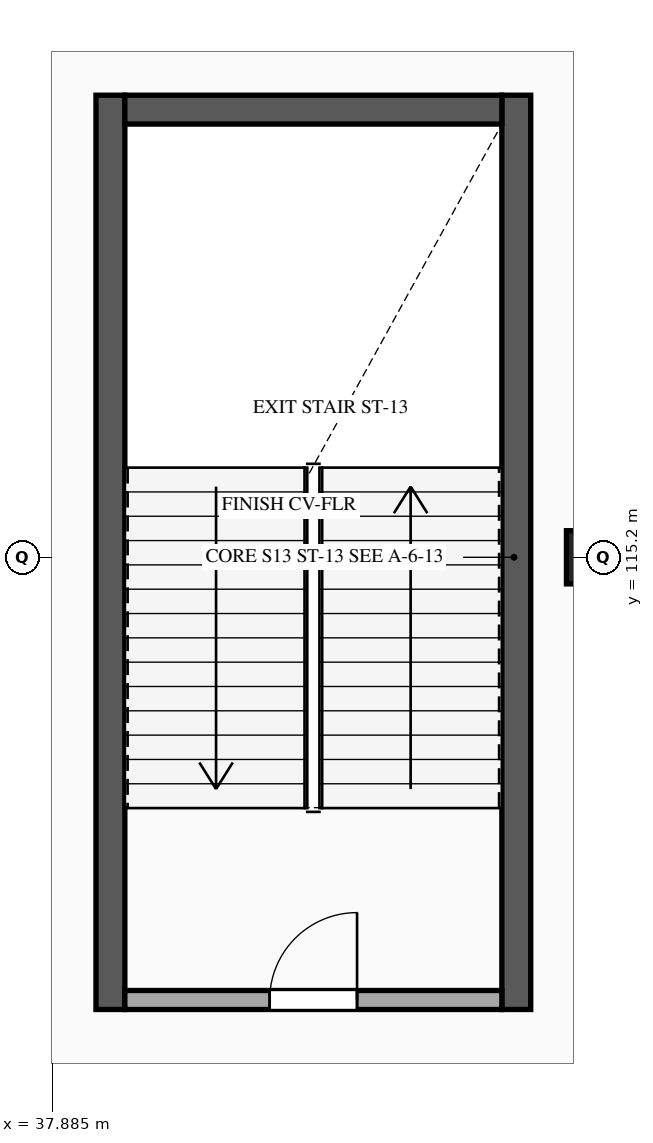
"""IFC4 building model, lengths in metres.
Left out: names, types, materials, properties, quantities, classifications, styles, units other than length and angle.
Written with IfcOpenShell. Run it as: python <this file> out.ifc"""

import sys

from ifc_helpers import new_model, si_unit, direction, frame, frame_2d, origin, origin_2d, place, context, subcontext, project, spatial, rectangle, extrude, element, fill, save


model = new_model("IFC4")
c1 = context("Model", 3, precision=1e-05, world=origin(), true_north=direction((0.0, 1.0)))
c2 = subcontext(c1, "Body", "Model", "MODEL_VIEW")
j1 = project(units=[si_unit("LENGTHUNIT", "METRE"), si_unit("PLANEANGLEUNIT", "RADIAN")], contexts=[c1])
p1 = place(None, origin())
s1 = spatial("IfcSite", under=j1, at=p1, CompositionType="ELEMENT")
p2 = place(p1, origin())
s2 = spatial("IfcBuilding", under=s1, at=p2, CompositionType="ELEMENT")
p3 = place(p2, frame((0.0, 0.0, 10.8)))
s3 = spatial("IfcBuildingStorey", under=s2, at=p3, CompositionType="ELEMENT", Elevation=10.8)
p4 = place(p3, frame((45.0, 115.2, 0.0), z_axis=(0.0, 0.0, 1.0), x_axis=(1.0, 0.0, 0.0)))
e1 = element("IfcColumn", 1, at=p4, inside=s3, PredefinedType="COLUMN", context=c2, shape_type="SweptSolid", body=[
    extrude(rectangle(XDim=0.7, YDim=0.7, at=origin_2d()), origin(), (0.0, 0.0, 1.0), 4.5),
])
for number, where, z_axis, x_axis in (
    (2, (38.65, 109.25, 0.0), (0.0, 0.0, 1.0), (0.0, 1.0, 0.0)),
    (3, (43.99, 121.28, 0.0), (0.0, 0.0, 1.0), (0.0, -1.0, 0.0)),
):
    element("IfcWall", number, at=place(p3, frame(where, z_axis=z_axis, x_axis=x_axis)), inside=s3, PredefinedType="SHEAR", context=c2, shape_type="SweptSolid", body=[
        extrude(rectangle(XDim=12.03, YDim=0.38, at=frame_2d((6.015, 0.0))), origin(), (0.0, 0.0, 1.0), 4.25),
    ])
p5 = place(p3, frame((38.84, 121.09, 0.0), z_axis=(0.0, 0.0, 1.0), x_axis=(1.0, 0.0, 0.0)))
e4 = element("IfcWall", 4, at=p5, inside=s3, PredefinedType="SHEAR", context=c2, shape_type="SweptSolid", body=[
    extrude(rectangle(XDim=4.96, YDim=0.38, at=frame_2d((2.48, 0.0))), origin(), (0.0, 0.0, 1.0), 4.25),
])
p6 = place(p3, frame((38.84, 109.375, 0.0), z_axis=(0.0, 0.0, 1.0), x_axis=(1.0, 0.0, 0.0)))
e5 = element("IfcWall", 5, at=p6, inside=s3, PredefinedType="STANDARD", context=c2, shape_type="SweptSolid", body=[
    extrude(rectangle(XDim=4.96, YDim=0.25, at=frame_2d((2.48, 0.0))), origin(), (0.0, 0.0, 1.0), 4.22),
])
p7 = place(p6, frame((1.905, 0.0, 0.0)))
e6 = element("IfcOpeningElement", 6, at=p7, cuts=e5, PredefinedType="OPENING", context=c2, shape_type="SweptSolid", body=[
    extrude(rectangle(XDim=1.15, YDim=2.2, at=frame_2d((0.575, 1.1))), frame((0.0, 0.135, 0.0), z_axis=(0.0, -1.0, 0.0), x_axis=(1.0, 0.0, 0.0)), (0.0, 0.0, 1.0), 0.27),
])
p8 = place(p7, origin())
e7 = element("IfcDoor", 7, at=p8, inside=s3, OperationType="SINGLE_SWING_RIGHT", PredefinedType="DOOR", context=c2, shape_type="SweptSolid", body=[
    extrude(rectangle(XDim=1.15, YDim=2.2, at=frame_2d((0.575, 1.1))), frame((0.0, 0.025, 0.0), z_axis=(0.0, -1.0, 0.0), x_axis=(1.0, 0.0, 0.0)), (0.0, 0.0, 1.0), 0.05),
])
fill(e6, e7)
save(model, sys.argv[1])
